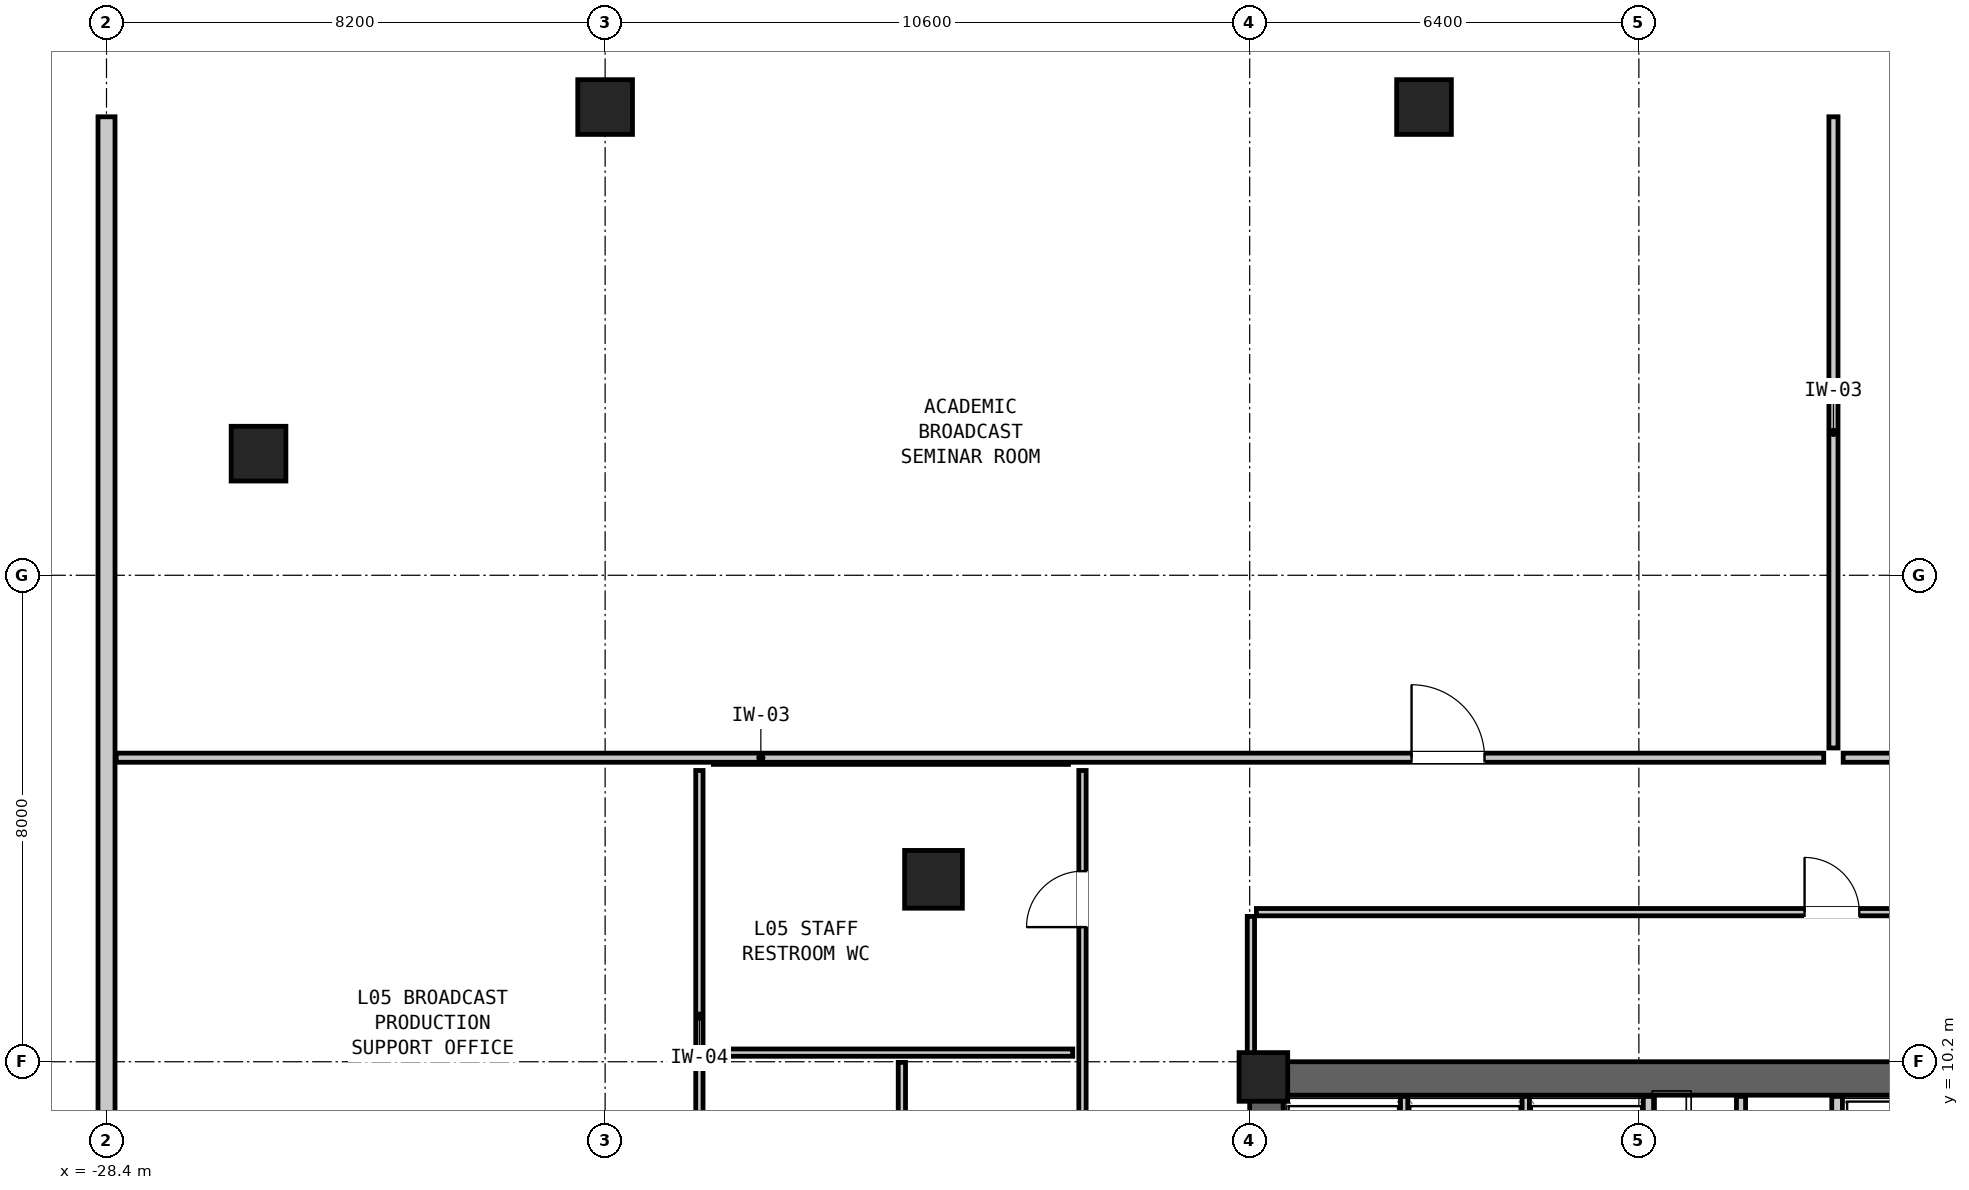
"""IFC4 building model, lengths in metres.
Left out: names, types, materials, properties, quantities, classifications, styles, units other than length and angle.
Written with IfcOpenShell. Run it as: python <this file> out.ifc"""

import sys

from ifc_helpers import new_model, si_unit, direction, frame, frame_2d, origin, origin_2d, place, context, subcontext, project, spatial, rectangle, hollow_rectangle, extrude, element, fill, save


model = new_model("IFC4")
c1 = context("Model", 3, precision=1e-05, world=origin(), true_north=direction((0.0, 1.0)))
c2 = subcontext(c1, "Body", "Model", "MODEL_VIEW")
j1 = project(units=[si_unit("LENGTHUNIT", "METRE"), si_unit("PLANEANGLEUNIT", "RADIAN")], contexts=[c1])
p1 = place(None, origin())
s1 = spatial("IfcSite", under=j1, at=p1, CompositionType="ELEMENT")
p2 = place(p1, origin())
s2 = spatial("IfcBuilding", under=s1, at=p2, CompositionType="ELEMENT")
p3 = place(p2, frame((0.0, 0.0, 21.9)))
s3 = spatial("IfcBuildingStorey", under=s2, at=p3, CompositionType="ELEMENT", Elevation=21.9)
p4 = place(p3, frame((-9.6, 9.925, 0.0), z_axis=(0.0, 0.0, 1.0), x_axis=(1.0, 0.0, 0.0)))
e1 = element("IfcWall", 1, at=p4, inside=s3, PredefinedType="SHEAR", context=c2, shape_type="SweptSolid", body=[
    extrude(rectangle(XDim=19.2, YDim=0.55, at=frame_2d((9.6, 0.0))), origin(), (0.0, 0.0, 1.0), 4.2),
])
p5 = place(p3, frame((-9.325, 3.6, 0.0), z_axis=(0.0, 0.0, 1.0), x_axis=(0.0, 1.0, 0.0)))
e2 = element("IfcWall", 2, at=p5, inside=s3, PredefinedType="SHEAR", context=c2, shape_type="SweptSolid", body=[
    extrude(rectangle(XDim=6.6, YDim=0.55, at=frame_2d((3.3, 0.0))), origin(), (0.0, 0.0, 1.0), 4.2),
])
p6 = place(p3, frame((-14.8, 13.2, 0.0), z_axis=(0.0, 0.0, 1.0), x_axis=(1.0, 0.0, 0.0)))
e3 = element("IfcColumn", 3, at=p6, inside=s3, PredefinedType="COLUMN", context=c2, shape_type="SweptSolid", body=[
    extrude(hollow_rectangle(XDim=0.95, YDim=0.95, WallThickness=0.06, at=origin_2d()), origin(), (0.0, 0.0, 1.0), 4.2),
])
for number, where, z_axis, x_axis in (
    (4, (-6.733, 25.9, 0.0), (0.0, 0.0, 1.0), (1.0, 0.0, 0.0)),
    (5, (-20.2, 25.9, 0.0), (0.0, 0.0, 1.0), (1.0, 0.0, 0.0)),
    (6, (-25.9, 20.2, 0.0), (0.0, 0.0, 1.0), (0.0, 1.0, 0.0)),
):
    element("IfcColumn", number, at=place(p3, frame(where, z_axis=z_axis, x_axis=x_axis)), inside=s3, PredefinedType="COLUMN", context=c2, shape_type="SweptSolid", body=[
        extrude(hollow_rectangle(XDim=0.9, YDim=0.9, WallThickness=0.055, at=origin_2d()), origin(), (0.0, 0.0, 1.0), 4.2),
    ])
p7 = place(p3, frame((-9.375, 9.95, 0.0), z_axis=(0.0, 0.0, 1.0), x_axis=(1.0, 0.0, 0.0)))
e7 = element("IfcColumn", 7, at=p7, inside=s3, PredefinedType="COLUMN", context=c2, shape_type="SweptSolid", body=[
    extrude(rectangle(XDim=0.8, YDim=0.8, at=origin_2d()), origin(), (0.0, 0.0, 1.0), 4.2),
])
p8 = place(p3, frame((0.06, 4.17, 0.0), z_axis=(0.0, 0.0, 1.0), x_axis=(0.0, 1.0, 0.0)))
e8 = element("IfcWall", 8, at=p8, inside=s3, PredefinedType="PARTITIONING", context=c2, shape_type="SweptSolid", body=[
    extrude(rectangle(XDim=5.46, YDim=0.175, at=frame_2d((2.73, 0.0))), origin(), (0.0, 0.0, 1.0), 3.98),
])
p9 = place(p8, frame((3.05, 0.0, 0.0)))
e9 = element("IfcOpeningElement", 9, at=p9, cuts=e8, PredefinedType="OPENING", context=c2, shape_type="SweptSolid", body=[
    extrude(rectangle(XDim=1.4, YDim=2.12, at=frame_2d((0.7, 1.06))), frame((0.0, 0.1, 0.0), z_axis=(0.0, -1.0, 0.0), x_axis=(1.0, 0.0, 0.0)), (0.0, 0.0, 1.0), 0.199),
])
p10 = place(p3, frame((-3.04, 4.17, 0.0), z_axis=(0.0, 0.0, 1.0), x_axis=(0.0, 1.0, 0.0)))
e10 = element("IfcWall", 10, at=p10, inside=s3, PredefinedType="PARTITIONING", context=c2, shape_type="SweptSolid", body=[
    extrude(rectangle(XDim=5.46, YDim=0.175, at=frame_2d((2.73, 0.0))), origin(), (0.0, 0.0, 1.0), 3.98),
])
p11 = place(p3, frame((-1.52, 4.17, 0.0), z_axis=(0.0, 0.0, 1.0), x_axis=(0.0, 1.0, 0.0)))
e11 = element("IfcWall", 11, at=p11, inside=s3, PredefinedType="PARTITIONING", context=c2, shape_type="SweptSolid", body=[
    extrude(rectangle(XDim=5.46, YDim=0.15, at=frame_2d((2.73, 0.0))), origin(), (0.0, 0.0, 1.0), 3.98),
])
p12 = place(p11, frame((3.9, 0.0, 0.0)))
e12 = element("IfcOpeningElement", 12, at=p12, cuts=e11, PredefinedType="OPENING", context=c2, shape_type="SweptSolid", body=[
    extrude(rectangle(XDim=0.9, YDim=2.05, at=frame_2d((0.45, 1.025))), frame((0.0, 0.087, 0.0), z_axis=(0.0, -1.0, 0.0), x_axis=(1.0, 0.0, 0.0)), (0.0, 0.0, 1.0), 0.174),
])
p13 = place(p11, frame((2.15, 0.0, 0.0)))
e13 = element("IfcOpeningElement", 13, at=p13, cuts=e11, PredefinedType="OPENING", context=c2, shape_type="SweptSolid", body=[
    extrude(rectangle(XDim=0.9, YDim=2.05, at=frame_2d((0.45, 1.025))), frame((0.0, 0.087, 0.0), z_axis=(0.0, -1.0, 0.0), x_axis=(1.0, 0.0, 0.0)), (0.0, 0.0, 1.0), 0.174),
])
p14 = place(p11, frame((0.35, 0.0, 0.0)))
e14 = element("IfcOpeningElement", 14, at=p14, cuts=e11, PredefinedType="OPENING", context=c2, shape_type="SweptSolid", body=[
    extrude(rectangle(XDim=0.92, YDim=2.1, at=frame_2d((0.46, 1.05))), frame((0.0, 0.087, 0.0), z_axis=(0.0, -1.0, 0.0), x_axis=(1.0, 0.0, 0.0)), (0.0, 0.0, 1.0), 0.174),
])
for number, where, z_axis, x_axis in (
    (15, (-7.06, 7.25, 0.0), (0.0, 0.0, 1.0), (0.0, 1.0, 0.0)),
    (16, (-5.06, 7.25, 0.0), (0.0, 0.0, 1.0), (0.0, 1.0, 0.0)),
):
    element("IfcWall", number, at=place(p3, frame(where, z_axis=z_axis, x_axis=x_axis)), inside=s3, PredefinedType="PARTITIONING", context=c2, shape_type="SweptSolid", body=[
        extrude(rectangle(XDim=2.38, YDim=0.12, at=frame_2d((1.19, 0.0))), origin(), (0.0, 0.0, 1.0), 3.98),
    ])
p15 = place(p3, frame((-18.42, 15.15, 0.0), z_axis=(0.0, 0.0, 1.0), x_axis=(1.0, 0.0, 0.0)))
e17 = element("IfcWall", 17, at=p15, inside=s3, PredefinedType="PARTITIONING", context=c2, shape_type="SweptSolid", body=[
    extrude(rectangle(XDim=5.84, YDim=0.12, at=frame_2d((2.92, 0.0))), origin(), (0.0, 0.0, 1.0), 3.98),
])
p16 = place(p3, frame((-18.65, 6.91, 0.0), z_axis=(0.0, 0.0, 1.0), x_axis=(0.0, 1.0, 0.0)))
e18 = element("IfcWall", 18, at=p16, inside=s3, PredefinedType="PARTITIONING", context=c2, shape_type="SweptSolid", body=[
    extrude(rectangle(XDim=8.08, YDim=0.12, at=frame_2d((4.04, 0.0))), origin(), (0.0, 0.0, 1.0), 3.98),
])
p17 = place(p3, frame((-18.49, 10.35, 0.0), z_axis=(0.0, 0.0, 1.0), x_axis=(1.0, 0.0, 0.0)))
e19 = element("IfcWall", 19, at=p17, inside=s3, PredefinedType="PARTITIONING", context=c2, shape_type="SweptSolid", body=[
    extrude(rectangle(XDim=5.98, YDim=0.12, at=frame_2d((2.99, 0.0))), origin(), (0.0, 0.0, 1.0), 2.949),
])
p18 = place(p3, frame((-15.32, 6.91, 0.0), z_axis=(0.0, 0.0, 1.0), x_axis=(0.0, 1.0, 0.0)))
e20 = element("IfcWall", 20, at=p18, inside=s3, PredefinedType="PARTITIONING", context=c2, shape_type="SweptSolid", body=[
    extrude(rectangle(XDim=3.28, YDim=0.12, at=frame_2d((1.64, 0.0))), origin(), (0.0, 0.0, 1.0), 3.98),
])
p19 = place(p18, frame((1.165, 0.0, 0.0)))
e21 = element("IfcOpeningElement", 21, at=p19, cuts=e20, PredefinedType="OPENING", context=c2, shape_type="SweptSolid", body=[
    extrude(rectangle(XDim=0.92, YDim=2.1, at=frame_2d((0.46, 1.05))), frame((0.0, 0.072, 0.0), z_axis=(0.0, -1.0, 0.0), x_axis=(1.0, 0.0, 0.0)), (0.0, 0.0, 1.0), 0.144),
])
p20 = place(p3, frame((-12.35, 6.91, 0.0), z_axis=(0.0, 0.0, 1.0), x_axis=(0.0, 1.0, 0.0)))
e22 = element("IfcWall", 22, at=p20, inside=s3, PredefinedType="PARTITIONING", context=c2, shape_type="SweptSolid", body=[
    extrude(rectangle(XDim=8.08, YDim=0.12, at=frame_2d((4.04, 0.0))), origin(), (0.0, 0.0, 1.0), 3.98),
])
p21 = place(p20, frame((1.303, 0.0, 0.0)))
e23 = element("IfcOpeningElement", 23, at=p21, cuts=e22, PredefinedType="OPENING", context=c2, shape_type="SweptSolid", body=[
    extrude(rectangle(XDim=0.95, YDim=2.1, at=frame_2d((0.475, 1.05))), frame((0.0, 0.072, 0.0), z_axis=(0.0, -1.0, 0.0), x_axis=(1.0, 0.0, 0.0)), (0.0, 0.0, 1.0), 0.144),
])
p22 = place(p20, frame((5.504, 0.0, 0.0)))
e24 = element("IfcOpeningElement", 24, at=p22, cuts=e22, PredefinedType="OPENING", context=c2, shape_type="SweptSolid", body=[
    extrude(rectangle(XDim=0.92, YDim=2.1, at=frame_2d((0.46, 1.05))), frame((0.0, 0.072, 0.0), z_axis=(0.0, -1.0, 0.0), x_axis=(1.0, 0.0, 0.0)), (0.0, 0.0, 1.0), 0.144),
])
p23 = place(p3, frame((-28.4, -25.74, 0.0), z_axis=(0.0, 0.0, 1.0), x_axis=(0.0, 1.0, 0.0)))
e25 = element("IfcWall", 25, at=p23, inside=s3, PredefinedType="MOVABLE", context=c2, shape_type="SweptSolid", body=[
    extrude(rectangle(XDim=51.48, YDim=0.28, at=frame_2d((25.74, 0.0))), origin(), (0.0, 0.0, 1.0), 3.98),
])
p24 = place(p23, frame((25.255, 0.0, 0.0)))
e26 = element("IfcOpeningElement", 26, at=p24, cuts=e25, PredefinedType="OPENING", context=c2, shape_type="SweptSolid", body=[
    extrude(rectangle(XDim=2.0, YDim=2.14, at=frame_2d((1.0, 1.07))), frame((0.0, 0.152, 0.0), z_axis=(0.0, -1.0, 0.0), x_axis=(1.0, 0.0, 0.0)), (0.0, 0.0, 1.0), 0.304),
])
p25 = place(p3, frame((-28.24, 15.2, 0.0), z_axis=(0.0, 0.0, 1.0), x_axis=(1.0, 0.0, 0.0)))
e27 = element("IfcWall", 27, at=p25, inside=s3, PredefinedType="PARTITIONING", context=c2, shape_type="SweptSolid", body=[
    extrude(rectangle(XDim=28.08, YDim=0.15, at=frame_2d((14.04, 0.0))), origin(), (0.0, 0.0, 1.0), 3.98),
])
p26 = place(p25, frame((21.302, 0.0, 0.0)))
e28 = element("IfcOpeningElement", 28, at=p26, cuts=e27, PredefinedType="OPENING", context=c2, shape_type="SweptSolid", body=[
    extrude(rectangle(XDim=1.2, YDim=2.1, at=frame_2d((0.6, 1.05))), frame((0.0, 0.087, 0.0), z_axis=(0.0, -1.0, 0.0), x_axis=(1.0, 0.0, 0.0)), (0.0, 0.0, 1.0), 0.174),
])
p27 = place(p3, frame((0.16, 15.2, 0.0), z_axis=(0.0, 0.0, 1.0), x_axis=(1.0, 0.0, 0.0)))
e29 = element("IfcWall", 29, at=p27, inside=s3, PredefinedType="PARTITIONING", context=c2, shape_type="SweptSolid", body=[
    extrude(rectangle(XDim=20.08, YDim=0.15, at=frame_2d((10.04, 0.0))), origin(), (0.0, 0.0, 1.0), 3.98),
])
p28 = place(p27, frame((4.42, 0.0, 0.0)))
e30 = element("IfcOpeningElement", 30, at=p28, cuts=e29, PredefinedType="OPENING", context=c2, shape_type="SweptSolid", body=[
    extrude(rectangle(XDim=1.2, YDim=2.1, at=frame_2d((0.6, 1.05))), frame((0.0, 0.087, 0.0), z_axis=(0.0, -1.0, 0.0), x_axis=(1.0, 0.0, 0.0)), (0.0, 0.0, 1.0), 0.174),
])
p29 = place(p3, frame((0.0, 15.36, 0.0), z_axis=(0.0, 0.0, 1.0), x_axis=(0.0, 1.0, 0.0)))
e31 = element("IfcWall", 31, at=p29, inside=s3, PredefinedType="PARTITIONING", context=c2, shape_type="SweptSolid", body=[
    extrude(rectangle(XDim=10.38, YDim=0.15, at=frame_2d((5.19, 0.0))), origin(), (0.0, 0.0, 1.0), 3.424),
])
p30 = place(p3, frame((-9.49, 12.66, 0.0), z_axis=(0.0, 0.0, 1.0), x_axis=(1.0, 0.0, 0.0)))
e32 = element("IfcWall", 32, at=p30, inside=s3, PredefinedType="PARTITIONING", context=c2, shape_type="SweptSolid", body=[
    extrude(rectangle(XDim=18.98, YDim=0.12, at=frame_2d((9.49, 0.0))), origin(), (0.0, 0.0, 1.0), 3.98),
])
p31 = place(p30, frame((9.015, 0.0, 0.0)))
e33 = element("IfcOpeningElement", 33, at=p31, cuts=e32, PredefinedType="OPENING", context=c2, shape_type="SweptSolid", body=[
    extrude(rectangle(XDim=0.9, YDim=2.05, at=frame_2d((0.45, 1.025))), frame((0.0, 0.072, 0.0), z_axis=(0.0, -1.0, 0.0), x_axis=(1.0, 0.0, 0.0)), (0.0, 0.0, 1.0), 0.144),
])
p32 = place(p3, frame((-9.58, 10.31, 0.0), z_axis=(0.0, 0.0, 1.0), x_axis=(0.0, 1.0, 0.0)))
e34 = element("IfcWall", 34, at=p32, inside=s3, PredefinedType="PARTITIONING", context=c2, shape_type="SweptSolid", body=[
    extrude(rectangle(XDim=2.28, YDim=0.12, at=frame_2d((1.14, 0.0))), origin(), (0.0, 0.0, 1.0), 2.949),
])
p33 = place(p22, origin())
e35 = element("IfcDoor", 35, at=p33, inside=s3, OperationType="SINGLE_SWING_LEFT", PredefinedType="DOOR", context=c2, shape_type="SweptSolid", body=[
    extrude(rectangle(XDim=0.92, YDim=2.1, at=frame_2d((0.46, 1.05))), frame((0.0, 0.025, 0.0), z_axis=(0.0, -1.0, 0.0), x_axis=(1.0, 0.0, 0.0)), (0.0, 0.0, 1.0), 0.05),
])
fill(e24, e35)
p34 = place(p26, origin())
e36 = element("IfcDoor", 36, at=p34, inside=s3, OperationType="SINGLE_SWING_LEFT", PredefinedType="DOOR", context=c2, shape_type="SweptSolid", body=[
    extrude(rectangle(XDim=1.2, YDim=2.1, at=frame_2d((0.6, 1.05))), frame((0.0, 0.025, 0.0), z_axis=(0.0, -1.0, 0.0), x_axis=(1.0, 0.0, 0.0)), (0.0, 0.0, 1.0), 0.05),
])
fill(e28, e36)
p35 = place(p31, origin())
e37 = element("IfcDoor", 37, at=p35, inside=s3, OperationType="SINGLE_SWING_LEFT", PredefinedType="DOOR", context=c2, shape_type="SweptSolid", body=[
    extrude(rectangle(XDim=0.9, YDim=2.05, at=frame_2d((0.45, 1.025))), frame((0.0, 0.025, 0.0), z_axis=(0.0, -1.0, 0.0), x_axis=(1.0, 0.0, 0.0)), (0.0, 0.0, 1.0), 0.05),
])
fill(e33, e37)
save(model, sys.argv[1])
